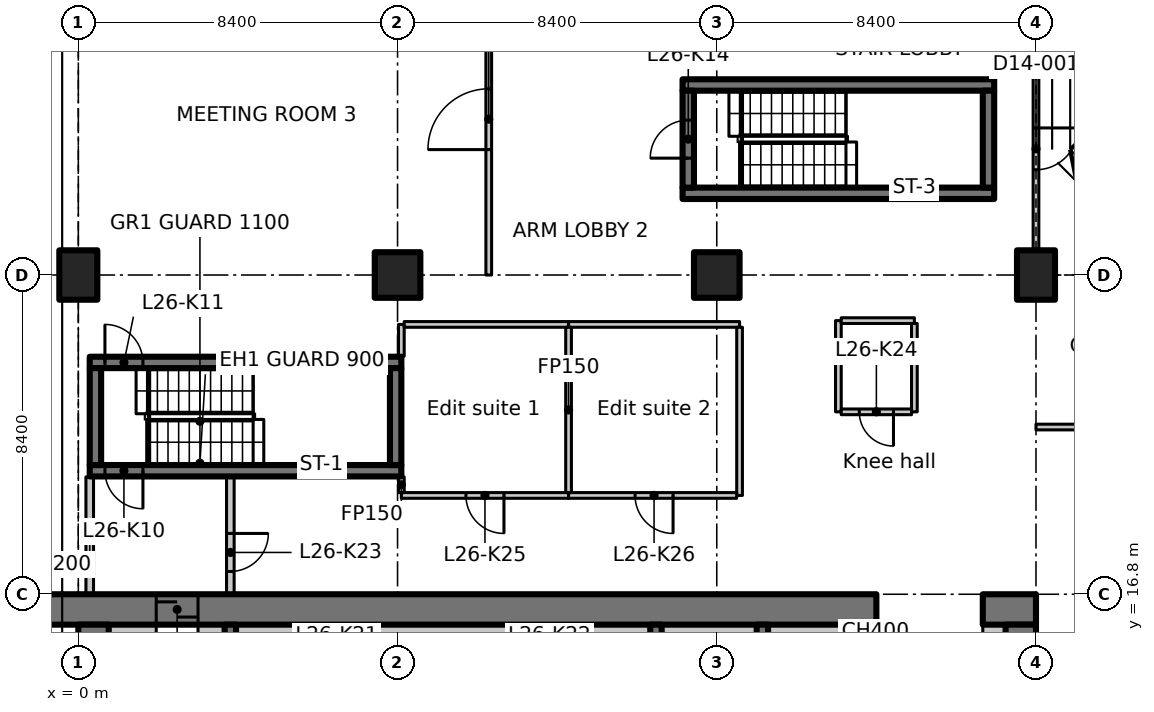
"""IFC4 building model, lengths in metres.
Left out: names, types, materials, properties, quantities, classifications, styles, units other than length and angle.
Written with IfcOpenShell. Run it as: python <this file> out.ifc"""

import sys

from ifc_helpers import new_model, si_unit, direction, frame, frame_2d, origin, origin_2d, place, context, subcontext, project, spatial, polyline, rectangle, outline, extrude, element, fill, save


model = new_model("IFC4")
c1 = context("Model", 3, precision=1e-05, world=origin(), true_north=direction((0.0, 1.0)))
c2 = subcontext(c1, "Body", "Model", "MODEL_VIEW")
j1 = project(units=[si_unit("LENGTHUNIT", "METRE"), si_unit("PLANEANGLEUNIT", "RADIAN")], contexts=[c1])
p1 = place(None, origin())
s1 = spatial("IfcSite", under=j1, at=p1, CompositionType="ELEMENT")
p2 = place(p1, origin())
s2 = spatial("IfcBuilding", under=s1, at=p2, CompositionType="ELEMENT")
p3 = place(p2, frame((0.0, 0.0, 109.7)))
s3 = spatial("IfcBuildingStorey", under=s2, at=p3, CompositionType="ELEMENT", Elevation=109.7)
p4 = place(p3, frame((0.0, 25.2, 0.0), z_axis=(0.0, 0.0, 1.0), x_axis=(1.0, 0.0, 0.0)))
e1 = element("IfcColumn", 1, at=p4, inside=s3, PredefinedType="COLUMN", context=c2, shape_type="SweptSolid", body=[
    extrude(rectangle(XDim=1.0, YDim=1.3, at=origin_2d()), origin(), (0.0, 0.0, 1.0), 3.35),
])
for number, where, z_axis, x_axis in (
    (2, (8.4, 25.2, 0.0), (0.0, 0.0, 1.0), (1.0, 0.0, 0.0)),
    (3, (16.8, 25.2, 0.0), (0.0, 0.0, 1.0), (1.0, 0.0, 0.0)),
):
    element("IfcColumn", number, at=place(p3, frame(where, z_axis=z_axis, x_axis=x_axis)), inside=s3, PredefinedType="COLUMN", context=c2, shape_type="SweptSolid", body=[
        extrude(rectangle(XDim=1.2, YDim=1.2, at=origin_2d()), origin(), (0.0, 0.0, 1.0), 3.35),
    ])
p5 = place(p3, frame((25.2, 25.2, 0.0), z_axis=(0.0, 0.0, 1.0), x_axis=(1.0, 0.0, 0.0)))
e4 = element("IfcColumn", 4, at=p5, inside=s3, PredefinedType="COLUMN", context=c2, shape_type="SweptSolid", body=[
    extrude(rectangle(XDim=1.0, YDim=1.3, at=origin_2d()), origin(), (0.0, 0.0, 1.0), 3.35),
])
p6 = place(p3, frame((-1.1, 16.4, 0.0), z_axis=(0.0, 0.0, 1.0), x_axis=(1.0, 0.0, 0.0)))
e5 = element("IfcWall", 5, at=p6, inside=s3, PredefinedType="SHEAR", context=c2, shape_type="SweptSolid", body=[
    extrude(rectangle(XDim=22.1, YDim=0.8, at=frame_2d((11.05, 0.0))), origin(), (0.0, 0.0, 1.0), 3.35),
])
p7 = place(p6, frame((3.15, 0.0, 0.0)))
e6 = element("IfcOpeningElement", 6, at=p7, cuts=e5, PredefinedType="OPENING", context=c2, shape_type="SweptSolid", body=[
    extrude(rectangle(XDim=1.1, YDim=2.3, at=frame_2d((0.55, 1.15))), frame((0.0, 0.41, 0.0), z_axis=(0.0, -1.0, 0.0), x_axis=(1.0, 0.0, 0.0)), (0.0, 0.0, 1.0), 0.82),
])
p8 = place(p3, frame((23.8, 16.4, 0.0), z_axis=(0.0, 0.0, 1.0), x_axis=(1.0, 0.0, 0.0)))
e7 = element("IfcWall", 7, at=p8, inside=s3, PredefinedType="SHEAR", context=c2, shape_type="SweptSolid", body=[
    extrude(rectangle(XDim=1.4, YDim=0.8, at=frame_2d((0.7, 0.0))), origin(), (0.0, 0.0, 1.0), 3.35),
])
p9 = place(p3, frame((0.4, 7.136, 0.0), z_axis=(0.0, 0.0, 1.0), x_axis=(0.0, 1.0, 0.0)))
e8 = element("IfcWall", 8, at=p9, inside=s3, PredefinedType="SHEAR", context=c2, shape_type="SweptSolid", body=[
    extrude(rectangle(XDim=8.864, YDim=0.8, at=frame_2d((4.432, 0.0))), origin(), (0.0, 0.0, 1.0), 3.35),
])
p10 = place(p3, frame((24.8, 12.6, 0.0), z_axis=(0.0, 0.0, 1.0), x_axis=(0.0, 1.0, 0.0)))
e9 = element("IfcWall", 9, at=p10, inside=s3, PredefinedType="SHEAR", context=c2, shape_type="SweptSolid", body=[
    extrude(rectangle(XDim=3.4, YDim=0.8, at=frame_2d((1.7, 0.0))), origin(), (0.0, 0.0, 1.0), 3.35),
])
p11 = place(p3, frame((0.8, 15.8, 0.0), z_axis=(0.0, 0.0, 1.0), x_axis=(1.0, 0.0, 0.0)))
e10 = element("IfcWall", 10, at=p11, inside=s3, PredefinedType="PARTITIONING", context=c2, shape_type="SweptSolid", body=[
    extrude(rectangle(XDim=1.25, YDim=0.4, at=frame_2d((0.625, 0.0))), origin(), (0.0, 0.0, 1.0), 3.35),
])
p12 = place(p3, frame((23.8, 15.8, 0.0), z_axis=(0.0, 0.0, 1.0), x_axis=(1.0, 0.0, 0.0)))
e11 = element("IfcWall", 11, at=p12, inside=s3, PredefinedType="PARTITIONING", context=c2, shape_type="SweptSolid", body=[
    extrude(rectangle(XDim=0.6, YDim=0.4, at=frame_2d((0.3, 0.0))), origin(), (0.0, 0.0, 1.0), 3.35),
])
for number, where, z_axis, x_axis in (
    (12, (4.0, 12.95, 0.0), (0.0, 0.0, 1.0), (0.0, 1.0, 0.0)),
    (13, (15.2, 12.95, 0.0), (0.0, 0.0, 1.0), (0.0, 1.0, 0.0)),
    (14, (18.0, 12.95, 0.0), (0.0, 0.0, 1.0), (0.0, 1.0, 0.0)),
    (15, (20.8, 12.95, 0.0), (0.0, 0.0, 1.0), (0.0, 1.0, 0.0)),
):
    element("IfcWall", number, at=place(p3, frame(where, z_axis=z_axis, x_axis=x_axis)), inside=s3, PredefinedType="SHEAR", context=c2, shape_type="SweptSolid", body=[
        extrude(rectangle(XDim=3.05, YDim=0.3, at=frame_2d((1.525, 0.0))), origin(), (0.0, 0.0, 1.0), 3.35),
    ])
p13 = place(p3, frame((8.5, 20.05, 0.0), z_axis=(0.0, 0.0, 1.0), x_axis=(-1.0, 0.0, 0.0)))
e16 = element("IfcWall", 16, at=p13, inside=s3, PredefinedType="SHEAR", context=c2, shape_type="SweptSolid", body=[
    extrude(rectangle(XDim=8.2, YDim=0.3, at=frame_2d((4.1, 0.0))), origin(), (0.0, 0.0, 1.0), 3.35),
])
p14 = place(p13, frame((6.8, 0.0, 0.0)))
e17 = element("IfcOpeningElement", 17, at=p14, cuts=e16, PredefinedType="OPENING", context=c2, shape_type="SweptSolid", body=[
    extrude(rectangle(XDim=1.0, YDim=2.1, at=frame_2d((0.5, 1.05))), frame((0.0, 0.16, 0.0), z_axis=(0.0, -1.0, 0.0), x_axis=(1.0, 0.0, 0.0)), (0.0, 0.0, 1.0), 0.32),
])
p15 = place(p3, frame((0.3, 22.9, 0.0), z_axis=(0.0, 0.0, 1.0), x_axis=(1.0, 0.0, 0.0)))
e18 = element("IfcWall", 18, at=p15, inside=s3, PredefinedType="SHEAR", context=c2, shape_type="SweptSolid", body=[
    extrude(rectangle(XDim=8.2, YDim=0.3, at=frame_2d((4.1, 0.0))), origin(), (0.0, 0.0, 1.0), 3.35),
])
p16 = place(p15, frame((0.4, 0.0, 0.0)))
e19 = element("IfcOpeningElement", 19, at=p16, cuts=e18, PredefinedType="OPENING", context=c2, shape_type="SweptSolid", body=[
    extrude(rectangle(XDim=1.0, YDim=2.1, at=frame_2d((0.5, 1.05))), frame((0.0, 0.16, 0.0), z_axis=(0.0, -1.0, 0.0), x_axis=(1.0, 0.0, 0.0)), (0.0, 0.0, 1.0), 0.32),
])
for number, where, z_axis, x_axis in (
    (20, (0.45, 20.2, 0.0), (0.0, 0.0, 1.0), (0.0, 1.0, 0.0)),
    (21, (8.35, 20.2, 0.0), (0.0, 0.0, 1.0), (0.0, 1.0, 0.0)),
):
    element("IfcWall", number, at=place(p3, frame(where, z_axis=z_axis, x_axis=x_axis)), inside=s3, PredefinedType="SHEAR", context=c2, shape_type="SweptSolid", body=[
        extrude(rectangle(XDim=2.55, YDim=0.3, at=frame_2d((1.275, 0.0))), origin(), (0.0, 0.0, 1.0), 3.35),
    ])
for number, where, z_axis, x_axis in (
    (22, (15.9, 27.35, 0.0), (0.0, 0.0, 1.0), (1.0, 0.0, 0.0)),
    (23, (15.9, 30.2, 0.0), (0.0, 0.0, 1.0), (1.0, 0.0, 0.0)),
):
    element("IfcWall", number, at=place(p3, frame(where, z_axis=z_axis, x_axis=x_axis)), inside=s3, PredefinedType="SHEAR", context=c2, shape_type="SweptSolid", body=[
        extrude(rectangle(XDim=8.2, YDim=0.3, at=frame_2d((4.1, 0.0))), origin(), (0.0, 0.0, 1.0), 3.35),
    ])
p17 = place(p3, frame((16.05, 27.5, 0.0), z_axis=(0.0, 0.0, 1.0), x_axis=(0.0, 1.0, 0.0)))
e24 = element("IfcWall", 24, at=p17, inside=s3, PredefinedType="SHEAR", context=c2, shape_type="SweptSolid", body=[
    extrude(rectangle(XDim=2.55, YDim=0.3, at=frame_2d((1.275, 0.0))), origin(), (0.0, 0.0, 1.0), 3.35),
])
p18 = place(p17, frame((0.775, 0.0, 0.0)))
e25 = element("IfcOpeningElement", 25, at=p18, cuts=e24, PredefinedType="OPENING", context=c2, shape_type="SweptSolid", body=[
    extrude(rectangle(XDim=1.0, YDim=2.1, at=frame_2d((0.5, 1.05))), frame((0.0, 0.16, 0.0), z_axis=(0.0, -1.0, 0.0), x_axis=(1.0, 0.0, 0.0)), (0.0, 0.0, 1.0), 0.32),
])
p19 = place(p3, frame((23.95, 27.5, 0.0), z_axis=(0.0, 0.0, 1.0), x_axis=(0.0, 1.0, 0.0)))
e26 = element("IfcWall", 26, at=p19, inside=s3, PredefinedType="SHEAR", context=c2, shape_type="SweptSolid", body=[
    extrude(rectangle(XDim=2.55, YDim=0.3, at=frame_2d((1.275, 0.0))), origin(), (0.0, 0.0, 1.0), 3.35),
])
p20 = place(p3, frame((0.3, 16.812, 0.0), z_axis=(0.0, 0.0, 1.0), x_axis=(0.0, 1.0, 0.0)))
e27 = element("IfcWall", 27, at=p20, inside=s3, PredefinedType="PARTITIONING", context=c2, shape_type="SweptSolid", body=[
    extrude(rectangle(XDim=3.076, YDim=0.2, at=frame_2d((1.538, 0.0))), origin(), (0.0, 0.0, 1.0), 2.98),
])
p21 = place(p3, frame((4.0, 19.888, 0.0), z_axis=(0.0, 0.0, 1.0), x_axis=(0.0, -1.0, 0.0)))
e28 = element("IfcWall", 28, at=p21, inside=s3, PredefinedType="PARTITIONING", context=c2, shape_type="SweptSolid", body=[
    extrude(rectangle(XDim=3.076, YDim=0.2, at=frame_2d((1.538, 0.0))), origin(), (0.0, 0.0, 1.0), 3.35),
])
p22 = place(p21, frame((1.488, 0.0, 0.0)))
e29 = element("IfcOpeningElement", 29, at=p22, cuts=e28, PredefinedType="OPENING", context=c2, shape_type="SweptSolid", body=[
    extrude(rectangle(XDim=1.0, YDim=2.1, at=frame_2d((0.5, 1.05))), frame((0.0, 0.11, 0.0), z_axis=(0.0, -1.0, 0.0), x_axis=(1.0, 0.0, 0.0)), (0.0, 0.0, 1.0), 0.22),
])
p23 = place(p3, frame((12.9, 19.4, 0.0), z_axis=(0.0, 0.0, 1.0), x_axis=(-1.0, 0.0, 0.0)))
e30 = element("IfcWall", 30, at=p23, inside=s3, PredefinedType="PARTITIONING", context=c2, shape_type="SweptSolid", body=[
    extrude(rectangle(XDim=4.4, YDim=0.15, at=frame_2d((2.2, 0.0))), origin(), (0.0, 0.0, 1.0), 3.35),
])
p24 = place(p23, frame((1.7, 0.0, 0.0)))
e31 = element("IfcOpeningElement", 31, at=p24, cuts=e30, PredefinedType="OPENING", context=c2, shape_type="SweptSolid", body=[
    extrude(rectangle(XDim=1.0, YDim=2.1, at=frame_2d((0.5, 1.05))), frame((0.0, 0.085, 0.0), z_axis=(0.0, -1.0, 0.0), x_axis=(1.0, 0.0, 0.0)), (0.0, 0.0, 1.0), 0.17),
])
p25 = place(p3, frame((8.5, 19.475, 0.0), z_axis=(0.0, 0.0, 1.0), x_axis=(0.0, 1.0, 0.0)))
e32 = element("IfcWall", 32, at=p25, inside=s3, PredefinedType="PARTITIONING", context=c2, shape_type="SweptSolid", body=[
    extrude(rectangle(XDim=0.413, YDim=0.15, at=frame_2d((0.207, 0.0))), origin(), (0.0, 0.0, 1.0), 3.35),
])
p26 = place(p3, frame((8.5, 23.062, 0.0), z_axis=(0.0, 0.0, 1.0), x_axis=(0.0, 1.0, 0.0)))
e33 = element("IfcWall", 33, at=p26, inside=s3, PredefinedType="PARTITIONING", context=c2, shape_type="SweptSolid", body=[
    extrude(rectangle(XDim=0.838, YDim=0.15, at=frame_2d((0.419, 0.0))), origin(), (0.0, 0.0, 1.0), 3.35),
])
p27 = place(p3, frame((8.575, 23.9, 0.0), z_axis=(0.0, 0.0, 1.0), x_axis=(1.0, 0.0, 0.0)))
e34 = element("IfcWall", 34, at=p27, inside=s3, PredefinedType="PARTITIONING", context=c2, shape_type="SweptSolid", body=[
    extrude(rectangle(XDim=4.325, YDim=0.15, at=frame_2d((2.163, 0.0))), origin(), (0.0, 0.0, 1.0), 3.35),
])
p28 = place(p3, frame((12.9, 23.9, 0.0), z_axis=(0.0, 0.0, 1.0), x_axis=(1.0, 0.0, 0.0)))
e35 = element("IfcWall", 35, at=p28, inside=s3, PredefinedType="PARTITIONING", context=c2, shape_type="SweptSolid", body=[
    extrude(rectangle(XDim=4.5, YDim=0.15, at=frame_2d((2.25, 0.0))), origin(), (0.0, 0.0, 1.0), 3.35),
])
p29 = place(p3, frame((17.4, 23.825, 0.0), z_axis=(0.0, 0.0, 1.0), x_axis=(0.0, -1.0, 0.0)))
e36 = element("IfcWall", 36, at=p29, inside=s3, PredefinedType="PARTITIONING", context=c2, shape_type="SweptSolid", body=[
    extrude(rectangle(XDim=4.425, YDim=0.15, at=frame_2d((2.212, 0.0))), origin(), (0.0, 0.0, 1.0), 3.35),
])
p30 = place(p3, frame((17.325, 19.4, 0.0), z_axis=(0.0, 0.0, 1.0), x_axis=(-1.0, 0.0, 0.0)))
e37 = element("IfcWall", 37, at=p30, inside=s3, PredefinedType="PARTITIONING", context=c2, shape_type="SweptSolid", body=[
    extrude(rectangle(XDim=4.425, YDim=0.15, at=frame_2d((2.212, 0.0))), origin(), (0.0, 0.0, 1.0), 3.35),
])
p31 = place(p30, frame((1.675, 0.0, 0.0)))
e38 = element("IfcOpeningElement", 38, at=p31, cuts=e37, PredefinedType="OPENING", context=c2, shape_type="SweptSolid", body=[
    extrude(rectangle(XDim=1.0, YDim=2.1, at=frame_2d((0.5, 1.05))), frame((0.0, 0.085, 0.0), z_axis=(0.0, -1.0, 0.0), x_axis=(1.0, 0.0, 0.0)), (0.0, 0.0, 1.0), 0.17),
])
p32 = place(p3, frame((12.9, 23.825, 0.0), z_axis=(0.0, 0.0, 1.0), x_axis=(0.0, -1.0, 0.0)))
e39 = element("IfcWall", 39, at=p32, inside=s3, PredefinedType="PARTITIONING", context=c2, shape_type="SweptSolid", body=[
    extrude(rectangle(XDim=4.35, YDim=0.15, at=frame_2d((2.175, 0.0))), origin(), (0.0, 0.0, 1.0), 3.35),
])
p33 = place(p3, frame((20.0, 21.6, 0.0), z_axis=(0.0, 0.0, 1.0), x_axis=(0.0, 1.0, 0.0)))
e40 = element("IfcWall", 40, at=p33, inside=s3, PredefinedType="PARTITIONING", context=c2, shape_type="SweptSolid", body=[
    extrude(rectangle(XDim=2.4, YDim=0.15, at=frame_2d((1.2, 0.0))), origin(), (0.0, 0.0, 1.0), 3.35),
])
p34 = place(p3, frame((20.075, 24.0, 0.0), z_axis=(0.0, 0.0, 1.0), x_axis=(1.0, 0.0, 0.0)))
e41 = element("IfcWall", 41, at=p34, inside=s3, PredefinedType="PARTITIONING", context=c2, shape_type="SweptSolid", body=[
    extrude(rectangle(XDim=1.925, YDim=0.15, at=frame_2d((0.962, 0.0))), origin(), (0.0, 0.0, 1.0), 3.35),
])
p35 = place(p3, frame((22.0, 23.925, 0.0), z_axis=(0.0, 0.0, 1.0), x_axis=(0.0, -1.0, 0.0)))
e42 = element("IfcWall", 42, at=p35, inside=s3, PredefinedType="PARTITIONING", context=c2, shape_type="SweptSolid", body=[
    extrude(rectangle(XDim=2.325, YDim=0.15, at=frame_2d((1.163, 0.0))), origin(), (0.0, 0.0, 1.0), 3.35),
])
p36 = place(p3, frame((21.925, 21.6, 0.0), z_axis=(0.0, 0.0, 1.0), x_axis=(-1.0, 0.0, 0.0)))
e43 = element("IfcWall", 43, at=p36, inside=s3, PredefinedType="PARTITIONING", context=c2, shape_type="SweptSolid", body=[
    extrude(rectangle(XDim=1.85, YDim=0.15, at=frame_2d((0.925, 0.0))), origin(), (0.0, 0.0, 1.0), 3.35),
])
p37 = place(p36, frame((0.475, 0.0, 0.0)))
e44 = element("IfcOpeningElement", 44, at=p37, cuts=e43, PredefinedType="OPENING", context=c2, shape_type="SweptSolid", body=[
    extrude(rectangle(XDim=0.9, YDim=2.1, at=frame_2d((0.45, 1.05))), frame((0.0, 0.085, 0.0), z_axis=(0.0, -1.0, 0.0), x_axis=(1.0, 0.0, 0.0)), (0.0, 0.0, 1.0), 0.17),
])
p38 = place(p3, frame((3.15, 15.8, 0.0), z_axis=(0.0, 0.0, 1.0), x_axis=(1.0, 0.0, 0.0)))
e45 = element("IfcWall", 45, at=p38, inside=s3, PredefinedType="PARTITIONING", context=c2, shape_type="SweptSolid", body=[
    extrude(rectangle(XDim=0.7, YDim=0.4, at=frame_2d((0.35, 0.0))), origin(), (0.0, 0.0, 1.0), 3.35),
])
p39 = place(p3, frame((4.15, 15.8, 0.0), z_axis=(0.0, 0.0, 1.0), x_axis=(1.0, 0.0, 0.0)))
e46 = element("IfcWall", 46, at=p39, inside=s3, PredefinedType="PARTITIONING", context=c2, shape_type="SweptSolid", body=[
    extrude(rectangle(XDim=10.9, YDim=0.4, at=frame_2d((5.45, 0.0))), origin(), (0.0, 0.0, 1.0), 3.35),
])
for number, where, z_axis, x_axis in (
    (47, (15.35, 15.8, 0.0), (0.0, 0.0, 1.0), (1.0, 0.0, 0.0)),
    (48, (18.15, 15.8, 0.0), (0.0, 0.0, 1.0), (1.0, 0.0, 0.0)),
):
    element("IfcWall", number, at=place(p3, frame(where, z_axis=z_axis, x_axis=x_axis)), inside=s3, PredefinedType="PARTITIONING", context=c2, shape_type="SweptSolid", body=[
        extrude(rectangle(XDim=2.5, YDim=0.4, at=frame_2d((1.25, 0.0))), origin(), (0.0, 0.0, 1.0), 3.35),
    ])
p40 = place(p3, frame((20.95, 15.8, 0.0), z_axis=(0.0, 0.0, 1.0), x_axis=(1.0, 0.0, 0.0)))
e49 = element("IfcWall", 49, at=p40, inside=s3, PredefinedType="PARTITIONING", context=c2, shape_type="SweptSolid", body=[
    extrude(rectangle(XDim=0.05, YDim=0.4, at=frame_2d((0.025, 0.0))), origin(), (0.0, 0.0, 1.0), 3.35),
])
p41 = place(p3, frame((25.2, 21.2, 0.0), z_axis=(0.0, 0.0, 1.0), x_axis=(1.0, 0.0, 0.0)))
e50 = element("IfcWall", 50, at=p41, inside=s3, PredefinedType="PARTITIONING", context=c2, shape_type="SweptSolid", body=[
    extrude(rectangle(XDim=4.2, YDim=0.15, at=frame_2d((2.1, 0.0))), origin(), (0.0, 0.0, 1.0), 3.33),
])
p42 = place(p3, frame((25.2, 31.0, 0.0), z_axis=(0.0, 0.0, 1.0), x_axis=(0.0, -1.0, 0.0)))
e51 = element("IfcWall", 51, at=p42, inside=s3, PredefinedType="PARTITIONING", context=c2, shape_type="SweptSolid", body=[
    extrude(outline(polyline([(0.0, 0.0), (5.13, 0.0), (5.13, 2.98), (0.0, 2.98), (0.0, 0.0)])), frame((0.0, 0.075, 0.0), z_axis=(0.0, -1.0, 0.0), x_axis=(1.0, 0.0, 0.0)), (0.0, 0.0, 1.0), 0.15),
])
p43 = place(p42, frame((1.93, 0.0, 0.0)))
e52 = element("IfcOpeningElement", 52, at=p43, cuts=e51, PredefinedType="OPENING", context=c2, shape_type="SweptSolid", body=[
    extrude(rectangle(XDim=1.1, YDim=2.1, at=frame_2d((0.55, 1.05))), frame((0.0, 0.085, 0.0), z_axis=(0.0, -1.0, 0.0), x_axis=(1.0, 0.0, 0.0)), (0.0, 0.0, 1.0), 0.17),
])
p44 = place(p3, frame((25.2, 31.0, 0.0), z_axis=(0.0, 0.0, 1.0), x_axis=(1.0, 0.0, 0.0)))
e53 = element("IfcWall", 53, at=p44, inside=s3, PredefinedType="PARTITIONING", context=c2, shape_type="SweptSolid", body=[
    extrude(rectangle(XDim=3.324, YDim=0.15, at=frame_2d((1.662, 0.0))), origin(), (0.0, 0.0, 1.0), 2.98),
])
p45 = place(p3, frame((10.8, 25.2, 0.0), z_axis=(0.0, 0.0, 1.0), x_axis=(0.0, 1.0, 0.0)))
e54 = element("IfcWall", 54, at=p45, inside=s3, PredefinedType="PARTITIONING", context=c2, shape_type="SweptSolid", body=[
    extrude(rectangle(XDim=8.4, YDim=0.15, at=frame_2d((4.2, 0.0))), origin(), (0.0, 0.0, 1.0), 3.33),
])
p46 = place(p45, frame((3.3, 0.0, 0.0)))
e55 = element("IfcOpeningElement", 55, at=p46, cuts=e54, PredefinedType="OPENING", context=c2, shape_type="SweptSolid", body=[
    extrude(rectangle(XDim=1.6, YDim=2.1, at=frame_2d((0.8, 1.05))), frame((0.0, 0.085, 0.0), z_axis=(0.0, -1.0, 0.0), x_axis=(1.0, 0.0, 0.0)), (0.0, 0.0, 1.0), 0.17),
])
p47 = place(p7, origin())
e56 = element("IfcDoor", 56, at=p47, inside=s3, OperationType="SLIDING_TO_LEFT", PredefinedType="DOOR", context=c2, shape_type="SweptSolid", body=[
    extrude(rectangle(XDim=1.1, YDim=2.3, at=frame_2d((0.55, 1.15))), frame((0.0, 0.025, 0.0), z_axis=(0.0, -1.0, 0.0), x_axis=(1.0, 0.0, 0.0)), (0.0, 0.0, 1.0), 0.05),
])
fill(e6, e56)
p48 = place(p14, origin())
e57 = element("IfcDoor", 57, at=p48, inside=s3, OperationType="SINGLE_SWING_RIGHT", PredefinedType="DOOR", context=c2, shape_type="SweptSolid", body=[
    extrude(rectangle(XDim=1.0, YDim=2.1, at=frame_2d((0.5, 1.05))), frame((0.0, 0.025, 0.0), z_axis=(0.0, -1.0, 0.0), x_axis=(1.0, 0.0, 0.0)), (0.0, 0.0, 1.0), 0.05),
])
fill(e17, e57)
p49 = place(p16, origin())
e58 = element("IfcDoor", 58, at=p49, inside=s3, OperationType="SINGLE_SWING_LEFT", PredefinedType="DOOR", context=c2, shape_type="SweptSolid", body=[
    extrude(rectangle(XDim=1.0, YDim=2.1, at=frame_2d((0.5, 1.05))), frame((0.0, 0.025, 0.0), z_axis=(0.0, -1.0, 0.0), x_axis=(1.0, 0.0, 0.0)), (0.0, 0.0, 1.0), 0.05),
])
fill(e19, e58)
p50 = place(p18, origin())
e59 = element("IfcDoor", 59, at=p50, inside=s3, OperationType="SINGLE_SWING_RIGHT", PredefinedType="DOOR", context=c2, shape_type="SweptSolid", body=[
    extrude(rectangle(XDim=1.0, YDim=2.1, at=frame_2d((0.5, 1.05))), frame((0.0, 0.025, 0.0), z_axis=(0.0, -1.0, 0.0), x_axis=(1.0, 0.0, 0.0)), (0.0, 0.0, 1.0), 0.05),
])
fill(e25, e59)
p51 = place(p22, origin())
e60 = element("IfcDoor", 60, at=p51, inside=s3, OperationType="SINGLE_SWING_LEFT", PredefinedType="DOOR", context=c2, shape_type="SweptSolid", body=[
    extrude(rectangle(XDim=1.0, YDim=2.1, at=frame_2d((0.5, 1.05))), frame((0.0, 0.025, 0.0), z_axis=(0.0, -1.0, 0.0), x_axis=(1.0, 0.0, 0.0)), (0.0, 0.0, 1.0), 0.05),
])
fill(e29, e60)
p52 = place(p37, origin())
e61 = element("IfcDoor", 61, at=p52, inside=s3, OperationType="SINGLE_SWING_RIGHT", PredefinedType="DOOR", context=c2, shape_type="SweptSolid", body=[
    extrude(rectangle(XDim=0.9, YDim=2.1, at=frame_2d((0.45, 1.05))), frame((0.0, 0.025, 0.0), z_axis=(0.0, -1.0, 0.0), x_axis=(1.0, 0.0, 0.0)), (0.0, 0.0, 1.0), 0.05),
])
fill(e44, e61)
p53 = place(p24, origin())
e62 = element("IfcDoor", 62, at=p53, inside=s3, OperationType="SINGLE_SWING_LEFT", PredefinedType="DOOR", context=c2, shape_type="SweptSolid", body=[
    extrude(rectangle(XDim=1.0, YDim=2.1, at=frame_2d((0.5, 1.05))), frame((0.0, 0.025, 0.0), z_axis=(0.0, -1.0, 0.0), x_axis=(1.0, 0.0, 0.0)), (0.0, 0.0, 1.0), 0.05),
])
fill(e31, e62)
p54 = place(p31, origin())
e63 = element("IfcDoor", 63, at=p54, inside=s3, OperationType="SINGLE_SWING_RIGHT", PredefinedType="DOOR", context=c2, shape_type="SweptSolid", body=[
    extrude(rectangle(XDim=1.0, YDim=2.1, at=frame_2d((0.5, 1.05))), frame((0.0, 0.025, 0.0), z_axis=(0.0, -1.0, 0.0), x_axis=(1.0, 0.0, 0.0)), (0.0, 0.0, 1.0), 0.05),
])
fill(e38, e63)
p55 = place(p43, origin())
e64 = element("IfcDoor", 64, at=p55, inside=s3, OperationType="SINGLE_SWING_RIGHT", PredefinedType="DOOR", context=c2, shape_type="SweptSolid", body=[
    extrude(rectangle(XDim=1.1, YDim=2.1, at=frame_2d((0.55, 1.05))), frame((0.0, 0.025, 0.0), z_axis=(0.0, -1.0, 0.0), x_axis=(1.0, 0.0, 0.0)), (0.0, 0.0, 1.0), 0.05),
])
fill(e52, e64)
p56 = place(p46, origin())
e65 = element("IfcDoor", 65, at=p56, inside=s3, OperationType="DOUBLE_DOOR_SINGLE_SWING", PredefinedType="DOOR", context=c2, shape_type="SweptSolid", body=[
    extrude(rectangle(XDim=1.6, YDim=2.1, at=frame_2d((0.8, 1.05))), frame((0.0, 0.025, 0.0), z_axis=(0.0, -1.0, 0.0), x_axis=(1.0, 0.0, 0.0)), (0.0, 0.0, 1.0), 0.05),
])
fill(e55, e65)
save(model, sys.argv[1])
